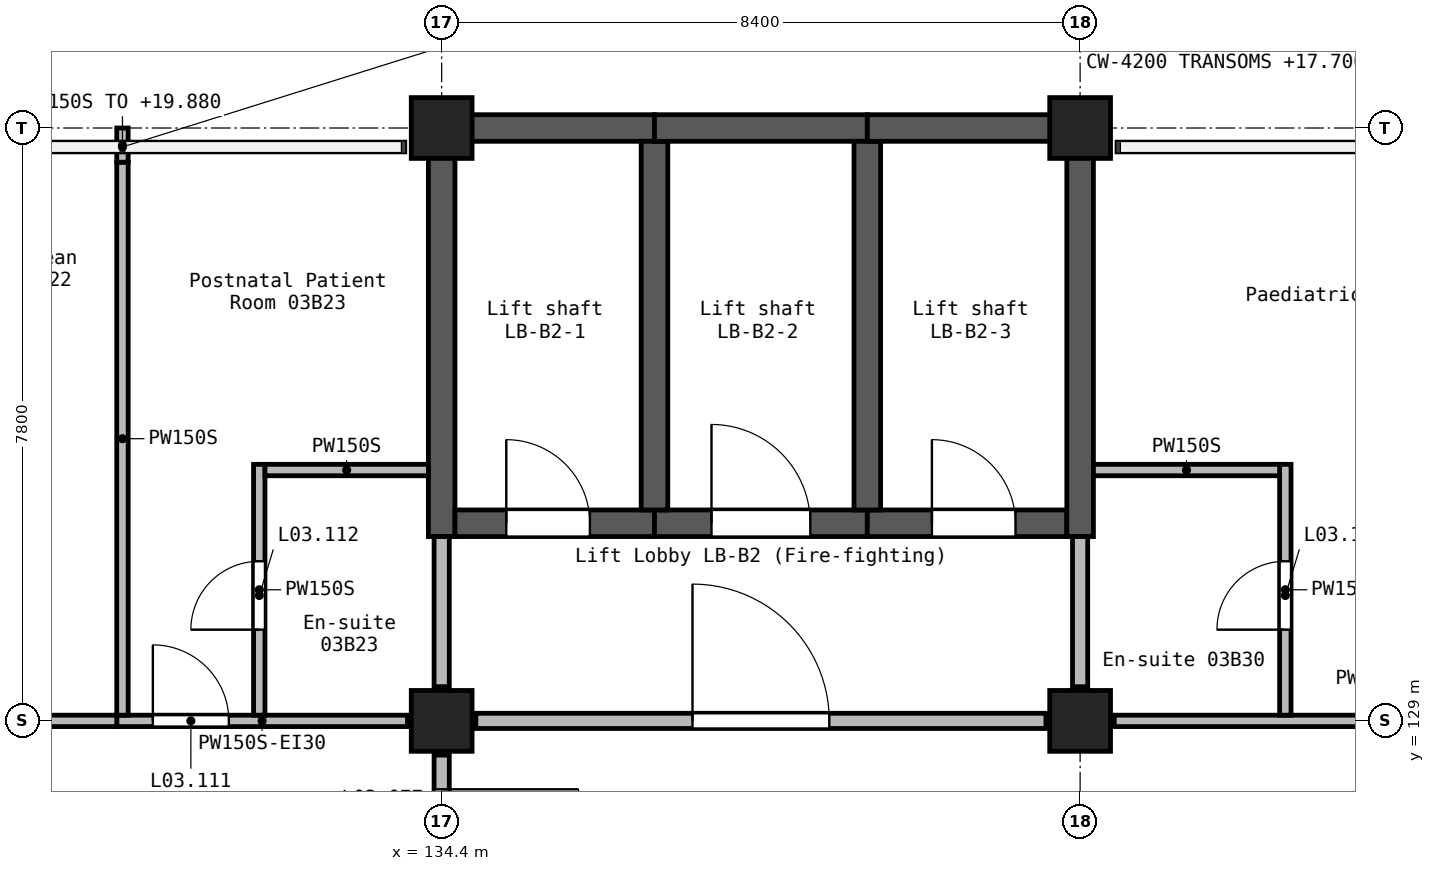
"""IFC4 building model, lengths in metres.
Left out: names, types, materials, properties, quantities, classifications, styles, units other than length and angle.
Written with IfcOpenShell. Run it as: python <this file> out.ifc"""

import sys

from ifc_helpers import new_model, si_unit, direction, frame, frame_2d, origin, origin_2d, place, context, subcontext, project, spatial, rectangle, extrude, element, fill, save


model = new_model("IFC4")
c1 = context("Model", 3, precision=1e-05, world=origin(), true_north=direction((0.0, 1.0)))
c2 = subcontext(c1, "Body", "Model", "MODEL_VIEW")
j1 = project(units=[si_unit("LENGTHUNIT", "METRE"), si_unit("PLANEANGLEUNIT", "RADIAN")], contexts=[c1])
p1 = place(None, origin())
s1 = spatial("IfcSite", under=j1, at=p1, CompositionType="ELEMENT")
p2 = place(p1, origin())
s2 = spatial("IfcBuilding", under=s1, at=p2, CompositionType="ELEMENT")
p3 = place(p2, frame((0.0, 0.0, 16.8)))
s3 = spatial("IfcBuildingStorey", under=s2, at=p3, CompositionType="ELEMENT", Elevation=16.8)
for number, where, z_axis, x_axis in (
    (1, (134.4, 129.0, 0.0), (0.0, 0.0, 1.0), (1.0, 0.0, 0.0)),
    (2, (134.4, 136.8, 0.0), (0.0, 0.0, 1.0), (1.0, 0.0, 0.0)),
    (3, (142.8, 129.0, 0.0), (0.0, 0.0, 1.0), (1.0, 0.0, 0.0)),
    (4, (142.8, 136.8, 0.0), (0.0, 0.0, 1.0), (1.0, 0.0, 0.0)),
):
    element("IfcColumn", number, at=place(p3, frame(where, z_axis=z_axis, x_axis=x_axis)), inside=s3, PredefinedType="COLUMN", context=c2, shape_type="SweptSolid", body=[
        extrude(rectangle(XDim=0.8, YDim=0.8, at=origin_2d()), origin(), (0.0, 0.0, 1.0), 4.2),
    ])
p4 = place(p3, frame((134.225, 136.8, 0.0), z_axis=(0.0, 0.0, 1.0), x_axis=(1.0, 0.0, 0.0)))
e5 = element("IfcWall", 5, at=p4, inside=s3, PredefinedType="SHEAR", context=c2, shape_type="SweptSolid", body=[
    extrude(rectangle(XDim=2.975, YDim=0.35, at=frame_2d((1.487, 0.0))), origin(), (0.0, 0.0, 1.0), 4.2),
])
p5 = place(p3, frame((134.4, 131.425, 0.0), z_axis=(0.0, 0.0, 1.0), x_axis=(0.0, 1.0, 0.0)))
e6 = element("IfcWall", 6, at=p5, inside=s3, PredefinedType="SHEAR", context=c2, shape_type="SweptSolid", body=[
    extrude(rectangle(XDim=5.2, YDim=0.35, at=frame_2d((2.6, 0.0))), origin(), (0.0, 0.0, 1.0), 4.2),
])
p6 = place(p3, frame((134.575, 131.6, 0.0), z_axis=(0.0, 0.0, 1.0), x_axis=(1.0, 0.0, 0.0)))
e7 = element("IfcWall", 7, at=p6, inside=s3, PredefinedType="SHEAR", context=c2, shape_type="SweptSolid", body=[
    extrude(rectangle(XDim=2.625, YDim=0.35, at=frame_2d((1.312, 0.0))), origin(), (0.0, 0.0, 1.0), 4.2),
])
p7 = place(p6, frame((0.675, 0.0, 0.0)))
e8 = element("IfcOpeningElement", 8, at=p7, cuts=e7, PredefinedType="OPENING", context=c2, shape_type="SweptSolid", body=[
    extrude(rectangle(XDim=1.1, YDim=2.1, at=frame_2d((0.55, 1.05))), frame((0.0, 0.185, 0.0), z_axis=(0.0, -1.0, 0.0), x_axis=(1.0, 0.0, 0.0)), (0.0, 0.0, 1.0), 0.37),
])
p8 = place(p3, frame((137.2, 131.6, 0.0), z_axis=(0.0, 0.0, 1.0), x_axis=(1.0, 0.0, 0.0)))
e9 = element("IfcWall", 9, at=p8, inside=s3, PredefinedType="SHEAR", context=c2, shape_type="SweptSolid", body=[
    extrude(rectangle(XDim=2.8, YDim=0.35, at=frame_2d((1.4, 0.0))), origin(), (0.0, 0.0, 1.0), 4.2),
])
p9 = place(p8, frame((0.75, 0.0, 0.0)))
e10 = element("IfcOpeningElement", 10, at=p9, cuts=e9, PredefinedType="OPENING", context=c2, shape_type="SweptSolid", body=[
    extrude(rectangle(XDim=1.3, YDim=2.1, at=frame_2d((0.65, 1.05))), frame((0.0, 0.185, 0.0), z_axis=(0.0, -1.0, 0.0), x_axis=(1.0, 0.0, 0.0)), (0.0, 0.0, 1.0), 0.37),
])
p10 = place(p3, frame((137.2, 131.775, 0.0), z_axis=(0.0, 0.0, 1.0), x_axis=(0.0, 1.0, 0.0)))
e11 = element("IfcWall", 11, at=p10, inside=s3, PredefinedType="SHEAR", context=c2, shape_type="SweptSolid", body=[
    extrude(rectangle(XDim=4.85, YDim=0.35, at=frame_2d((2.425, 0.0))), origin(), (0.0, 0.0, 1.0), 4.2),
])
p11 = place(p3, frame((137.2, 136.8, 0.0), z_axis=(0.0, 0.0, 1.0), x_axis=(1.0, 0.0, 0.0)))
e12 = element("IfcWall", 12, at=p11, inside=s3, PredefinedType="SHEAR", context=c2, shape_type="SweptSolid", body=[
    extrude(rectangle(XDim=2.8, YDim=0.35, at=frame_2d((1.4, 0.0))), origin(), (0.0, 0.0, 1.0), 4.2),
])
p12 = place(p3, frame((140.0, 131.6, 0.0), z_axis=(0.0, 0.0, 1.0), x_axis=(1.0, 0.0, 0.0)))
e13 = element("IfcWall", 13, at=p12, inside=s3, PredefinedType="SHEAR", context=c2, shape_type="SweptSolid", body=[
    extrude(rectangle(XDim=2.625, YDim=0.35, at=frame_2d((1.312, 0.0))), origin(), (0.0, 0.0, 1.0), 4.2),
])
p13 = place(p12, frame((0.85, 0.0, 0.0)))
e14 = element("IfcOpeningElement", 14, at=p13, cuts=e13, PredefinedType="OPENING", context=c2, shape_type="SweptSolid", body=[
    extrude(rectangle(XDim=1.1, YDim=2.1, at=frame_2d((0.55, 1.05))), frame((0.0, 0.185, 0.0), z_axis=(0.0, -1.0, 0.0), x_axis=(1.0, 0.0, 0.0)), (0.0, 0.0, 1.0), 0.37),
])
p14 = place(p3, frame((140.0, 131.775, 0.0), z_axis=(0.0, 0.0, 1.0), x_axis=(0.0, 1.0, 0.0)))
e15 = element("IfcWall", 15, at=p14, inside=s3, PredefinedType="SHEAR", context=c2, shape_type="SweptSolid", body=[
    extrude(rectangle(XDim=4.85, YDim=0.35, at=frame_2d((2.425, 0.0))), origin(), (0.0, 0.0, 1.0), 4.2),
])
p15 = place(p3, frame((140.0, 136.8, 0.0), z_axis=(0.0, 0.0, 1.0), x_axis=(1.0, 0.0, 0.0)))
e16 = element("IfcWall", 16, at=p15, inside=s3, PredefinedType="SHEAR", context=c2, shape_type="SweptSolid", body=[
    extrude(rectangle(XDim=2.625, YDim=0.35, at=frame_2d((1.312, 0.0))), origin(), (0.0, 0.0, 1.0), 4.2),
])
p16 = place(p3, frame((142.8, 131.425, 0.0), z_axis=(0.0, 0.0, 1.0), x_axis=(0.0, 1.0, 0.0)))
e17 = element("IfcWall", 17, at=p16, inside=s3, PredefinedType="SHEAR", context=c2, shape_type="SweptSolid", body=[
    extrude(rectangle(XDim=5.55, YDim=0.35, at=frame_2d((2.775, 0.0))), origin(), (0.0, 0.0, 1.0), 4.2),
])
p17 = place(p3, frame((134.4, 131.425, 0.0), z_axis=(0.0, 0.0, 1.0), x_axis=(0.0, -1.0, 0.0)))
e18 = element("IfcWall", 18, at=p17, inside=s3, PredefinedType="SOLIDWALL", context=c2, shape_type="SweptSolid", body=[
    extrude(rectangle(XDim=1.975, YDim=0.2, at=frame_2d((0.988, 0.0))), origin(), (0.0, 0.0, 1.0), 3.9),
])
p18 = place(p3, frame((134.4, 128.55, 0.0), z_axis=(0.0, 0.0, 1.0), x_axis=(0.0, -1.0, 0.0)))
e19 = element("IfcWall", 19, at=p18, inside=s3, PredefinedType="SOLIDWALL", context=c2, shape_type="SweptSolid", body=[
    extrude(rectangle(XDim=2.7, YDim=0.2, at=frame_2d((1.35, 0.0))), origin(), (0.0, 0.0, 1.0), 3.9),
])
p19 = place(p18, frame((0.45, 0.0, 0.0)))
e20 = element("IfcOpeningElement", 20, at=p19, cuts=e19, PredefinedType="OPENING", context=c2, shape_type="SweptSolid", body=[
    extrude(rectangle(XDim=1.8, YDim=2.1, at=frame_2d((0.9, 1.05))), frame((0.0, 0.11, 0.0), z_axis=(0.0, -1.0, 0.0), x_axis=(1.0, 0.0, 0.0)), (0.0, 0.0, 1.0), 0.22),
])
p20 = place(p3, frame((134.85, 129.0, 0.0), z_axis=(0.0, 0.0, 1.0), x_axis=(1.0, 0.0, 0.0)))
e21 = element("IfcWall", 21, at=p20, inside=s3, PredefinedType="SOLIDWALL", context=c2, shape_type="SweptSolid", body=[
    extrude(rectangle(XDim=7.5, YDim=0.2, at=frame_2d((3.75, 0.0))), origin(), (0.0, 0.0, 1.0), 3.9),
])
p21 = place(p20, frame((2.85, 0.0, 0.0)))
e22 = element("IfcOpeningElement", 22, at=p21, cuts=e21, PredefinedType="OPENING", context=c2, shape_type="SweptSolid", body=[
    extrude(rectangle(XDim=1.8, YDim=2.1, at=frame_2d((0.9, 1.05))), frame((0.0, 0.11, 0.0), z_axis=(0.0, -1.0, 0.0), x_axis=(1.0, 0.0, 0.0)), (0.0, 0.0, 1.0), 0.22),
])
p22 = place(p3, frame((142.8, 129.45, 0.0), z_axis=(0.0, 0.0, 1.0), x_axis=(0.0, 1.0, 0.0)))
e23 = element("IfcWall", 23, at=p22, inside=s3, PredefinedType="SOLIDWALL", context=c2, shape_type="SweptSolid", body=[
    extrude(rectangle(XDim=1.975, YDim=0.2, at=frame_2d((0.988, 0.0))), origin(), (0.0, 0.0, 1.0), 3.9),
])
p23 = place(p3, frame((150.75, 129.0, 0.0), z_axis=(0.0, 0.0, 1.0), x_axis=(-1.0, 0.0, 0.0)))
e24 = element("IfcWall", 24, at=p23, inside=s3, PredefinedType="PARTITIONING", context=c2, shape_type="SweptSolid", body=[
    extrude(rectangle(XDim=7.5, YDim=0.15, at=frame_2d((3.75, 0.0))), origin(), (0.0, 0.0, 1.0), 3.9),
])
p24 = place(p23, frame((1.9, 0.0, 0.0)))
e25 = element("IfcOpeningElement", 25, at=p24, cuts=e24, PredefinedType="OPENING", context=c2, shape_type="SweptSolid", body=[
    extrude(rectangle(XDim=1.0, YDim=2.1, at=frame_2d((0.5, 1.05))), frame((0.0, 0.085, 0.0), z_axis=(0.0, -1.0, 0.0), x_axis=(1.0, 0.0, 0.0)), (0.0, 0.0, 1.0), 0.17),
])
p25 = place(p3, frame((130.125, 129.0, 0.0), z_axis=(0.0, 0.0, 1.0), x_axis=(1.0, 0.0, 0.0)))
e26 = element("IfcWall", 26, at=p25, inside=s3, PredefinedType="PARTITIONING", context=c2, shape_type="SweptSolid", body=[
    extrude(rectangle(XDim=3.825, YDim=0.15, at=frame_2d((1.913, 0.0))), origin(), (0.0, 0.0, 1.0), 3.9),
])
p26 = place(p25, frame((0.475, 0.0, 0.0)))
e27 = element("IfcOpeningElement", 27, at=p26, cuts=e26, PredefinedType="OPENING", context=c2, shape_type="SweptSolid", body=[
    extrude(rectangle(XDim=1.0, YDim=2.1, at=frame_2d((0.5, 1.05))), frame((0.0, 0.085, 0.0), z_axis=(0.0, -1.0, 0.0), x_axis=(1.0, 0.0, 0.0)), (0.0, 0.0, 1.0), 0.17),
])
p27 = place(p3, frame((126.45, 129.0, 0.0), z_axis=(0.0, 0.0, 1.0), x_axis=(1.0, 0.0, 0.0)))
e28 = element("IfcWall", 28, at=p27, inside=s3, PredefinedType="PARTITIONING", context=c2, shape_type="SweptSolid", body=[
    extrude(rectangle(XDim=3.675, YDim=0.15, at=frame_2d((1.837, 0.0))), origin(), (0.0, 0.0, 1.0), 3.9),
])
p28 = place(p27, frame((1.15, 0.0, 0.0)))
e29 = element("IfcOpeningElement", 29, at=p28, cuts=e28, PredefinedType="OPENING", context=c2, shape_type="SweptSolid", body=[
    extrude(rectangle(XDim=1.0, YDim=2.1, at=frame_2d((0.5, 1.05))), frame((0.0, 0.085, 0.0), z_axis=(0.0, -1.0, 0.0), x_axis=(1.0, 0.0, 0.0)), (0.0, 0.0, 1.0), 0.17),
])
p29 = place(p3, frame((130.2, 129.075, 0.0), z_axis=(0.0, 0.0, 1.0), x_axis=(0.0, 1.0, 0.0)))
e30 = element("IfcWall", 30, at=p29, inside=s3, PredefinedType="PARTITIONING", context=c2, shape_type="SweptSolid", body=[
    extrude(rectangle(XDim=7.275, YDim=0.15, at=frame_2d((3.638, 0.0))), origin(), (0.0, 0.0, 1.0), 3.9),
])
p30 = place(p3, frame((130.2, 136.35, 0.0), z_axis=(0.0, 0.0, 1.0), x_axis=(0.0, 1.0, 0.0)))
e31 = element("IfcWall", 31, at=p30, inside=s3, PredefinedType="PARTITIONING", context=c2, shape_type="SweptSolid", body=[
    extrude(rectangle(XDim=0.45, YDim=0.15, at=frame_2d((0.225, 0.0))), origin(), (0.0, 0.0, 1.0), 3.08),
])
p31 = place(p3, frame((132.0, 129.075, 0.0), z_axis=(0.0, 0.0, 1.0), x_axis=(0.0, 1.0, 0.0)))
e32 = element("IfcWall", 32, at=p31, inside=s3, PredefinedType="PARTITIONING", context=c2, shape_type="SweptSolid", body=[
    extrude(rectangle(XDim=3.3, YDim=0.15, at=frame_2d((1.65, 0.0))), origin(), (0.0, 0.0, 1.0), 3.9),
])
p32 = place(p31, frame((1.125, 0.0, 0.0)))
e33 = element("IfcOpeningElement", 33, at=p32, cuts=e32, PredefinedType="OPENING", context=c2, shape_type="SweptSolid", body=[
    extrude(rectangle(XDim=0.9, YDim=2.1, at=frame_2d((0.45, 1.05))), frame((0.0, 0.085, 0.0), z_axis=(0.0, -1.0, 0.0), x_axis=(1.0, 0.0, 0.0)), (0.0, 0.0, 1.0), 0.17),
])
p33 = place(p3, frame((145.5, 129.075, 0.0), z_axis=(0.0, 0.0, 1.0), x_axis=(0.0, 1.0, 0.0)))
e34 = element("IfcWall", 34, at=p33, inside=s3, PredefinedType="PARTITIONING", context=c2, shape_type="SweptSolid", body=[
    extrude(rectangle(XDim=3.3, YDim=0.15, at=frame_2d((1.65, 0.0))), origin(), (0.0, 0.0, 1.0), 3.9),
])
p34 = place(p33, frame((1.125, 0.0, 0.0)))
e35 = element("IfcOpeningElement", 35, at=p34, cuts=e34, PredefinedType="OPENING", context=c2, shape_type="SweptSolid", body=[
    extrude(rectangle(XDim=0.9, YDim=2.1, at=frame_2d((0.45, 1.05))), frame((0.0, 0.085, 0.0), z_axis=(0.0, -1.0, 0.0), x_axis=(1.0, 0.0, 0.0)), (0.0, 0.0, 1.0), 0.17),
])
p35 = place(p3, frame((142.975, 132.3, 0.0), z_axis=(0.0, 0.0, 1.0), x_axis=(1.0, 0.0, 0.0)))
e36 = element("IfcWall", 36, at=p35, inside=s3, PredefinedType="PARTITIONING", context=c2, shape_type="SweptSolid", body=[
    extrude(rectangle(XDim=2.45, YDim=0.15, at=frame_2d((1.225, 0.0))), origin(), (0.0, 0.0, 1.0), 3.9),
])
p36 = place(p3, frame((132.075, 132.3, 0.0), z_axis=(0.0, 0.0, 1.0), x_axis=(1.0, 0.0, 0.0)))
e37 = element("IfcWall", 37, at=p36, inside=s3, PredefinedType="PARTITIONING", context=c2, shape_type="SweptSolid", body=[
    extrude(rectangle(XDim=2.15, YDim=0.15, at=frame_2d((1.075, 0.0))), origin(), (0.0, 0.0, 1.0), 3.9),
])
p37 = place(p19, origin())
e38 = element("IfcDoor", 38, at=p37, inside=s3, OperationType="DOUBLE_DOOR_SINGLE_SWING", PredefinedType="DOOR", context=c2, shape_type="SweptSolid", body=[
    extrude(rectangle(XDim=1.8, YDim=2.1, at=frame_2d((0.9, 1.05))), frame((0.0, 0.025, 0.0), z_axis=(0.0, -1.0, 0.0), x_axis=(1.0, 0.0, 0.0)), (0.0, 0.0, 1.0), 0.05),
])
fill(e20, e38)
p38 = place(p26, origin())
e39 = element("IfcDoor", 39, at=p38, inside=s3, OperationType="SINGLE_SWING_LEFT", PredefinedType="DOOR", context=c2, shape_type="SweptSolid", body=[
    extrude(rectangle(XDim=1.0, YDim=2.1, at=frame_2d((0.5, 1.05))), frame((0.0, 0.025, 0.0), z_axis=(0.0, -1.0, 0.0), x_axis=(1.0, 0.0, 0.0)), (0.0, 0.0, 1.0), 0.05),
])
fill(e27, e39)
p39 = place(p32, frame((0.9, 0.0, 0.0), z_axis=(0.0, 0.0, 1.0), x_axis=(-1.0, 0.0, 0.0)))
e40 = element("IfcDoor", 40, at=p39, inside=s3, OperationType="SINGLE_SWING_RIGHT", PredefinedType="DOOR", context=c2, shape_type="SweptSolid", body=[
    extrude(rectangle(XDim=0.9, YDim=2.1, at=frame_2d((0.45, 1.05))), frame((0.0, 0.025, 0.0), z_axis=(0.0, -1.0, 0.0), x_axis=(1.0, 0.0, 0.0)), (0.0, 0.0, 1.0), 0.05),
])
fill(e33, e40)
p40 = place(p34, origin())
e41 = element("IfcDoor", 41, at=p40, inside=s3, OperationType="SINGLE_SWING_LEFT", PredefinedType="DOOR", context=c2, shape_type="SweptSolid", body=[
    extrude(rectangle(XDim=0.9, YDim=2.1, at=frame_2d((0.45, 1.05))), frame((0.0, 0.025, 0.0), z_axis=(0.0, -1.0, 0.0), x_axis=(1.0, 0.0, 0.0)), (0.0, 0.0, 1.0), 0.05),
])
fill(e35, e41)
p41 = place(p21, origin())
e42 = element("IfcDoor", 42, at=p41, inside=s3, OperationType="DOUBLE_DOOR_SINGLE_SWING", PredefinedType="DOOR", context=c2, shape_type="SweptSolid", body=[
    extrude(rectangle(XDim=1.8, YDim=2.1, at=frame_2d((0.9, 1.05))), frame((0.0, 0.025, 0.0), z_axis=(0.0, -1.0, 0.0), x_axis=(1.0, 0.0, 0.0)), (0.0, 0.0, 1.0), 0.05),
])
fill(e22, e42)
p42 = place(p7, origin())
e43 = element("IfcDoor", 43, at=p42, inside=s3, OperationType="DOUBLE_DOOR_SLIDING", PredefinedType="DOOR", context=c2, shape_type="SweptSolid", body=[
    extrude(rectangle(XDim=1.1, YDim=2.1, at=frame_2d((0.55, 1.05))), frame((0.0, 0.025, 0.0), z_axis=(0.0, -1.0, 0.0), x_axis=(1.0, 0.0, 0.0)), (0.0, 0.0, 1.0), 0.05),
])
fill(e8, e43)
p43 = place(p9, origin())
e44 = element("IfcDoor", 44, at=p43, inside=s3, OperationType="DOUBLE_DOOR_SLIDING", PredefinedType="DOOR", context=c2, shape_type="SweptSolid", body=[
    extrude(rectangle(XDim=1.3, YDim=2.1, at=frame_2d((0.65, 1.05))), frame((0.0, 0.025, 0.0), z_axis=(0.0, -1.0, 0.0), x_axis=(1.0, 0.0, 0.0)), (0.0, 0.0, 1.0), 0.05),
])
fill(e10, e44)
p44 = place(p13, origin())
e45 = element("IfcDoor", 45, at=p44, inside=s3, OperationType="DOUBLE_DOOR_SLIDING", PredefinedType="DOOR", context=c2, shape_type="SweptSolid", body=[
    extrude(rectangle(XDim=1.1, YDim=2.1, at=frame_2d((0.55, 1.05))), frame((0.0, 0.025, 0.0), z_axis=(0.0, -1.0, 0.0), x_axis=(1.0, 0.0, 0.0)), (0.0, 0.0, 1.0), 0.05),
])
fill(e14, e45)
save(model, sys.argv[1])
